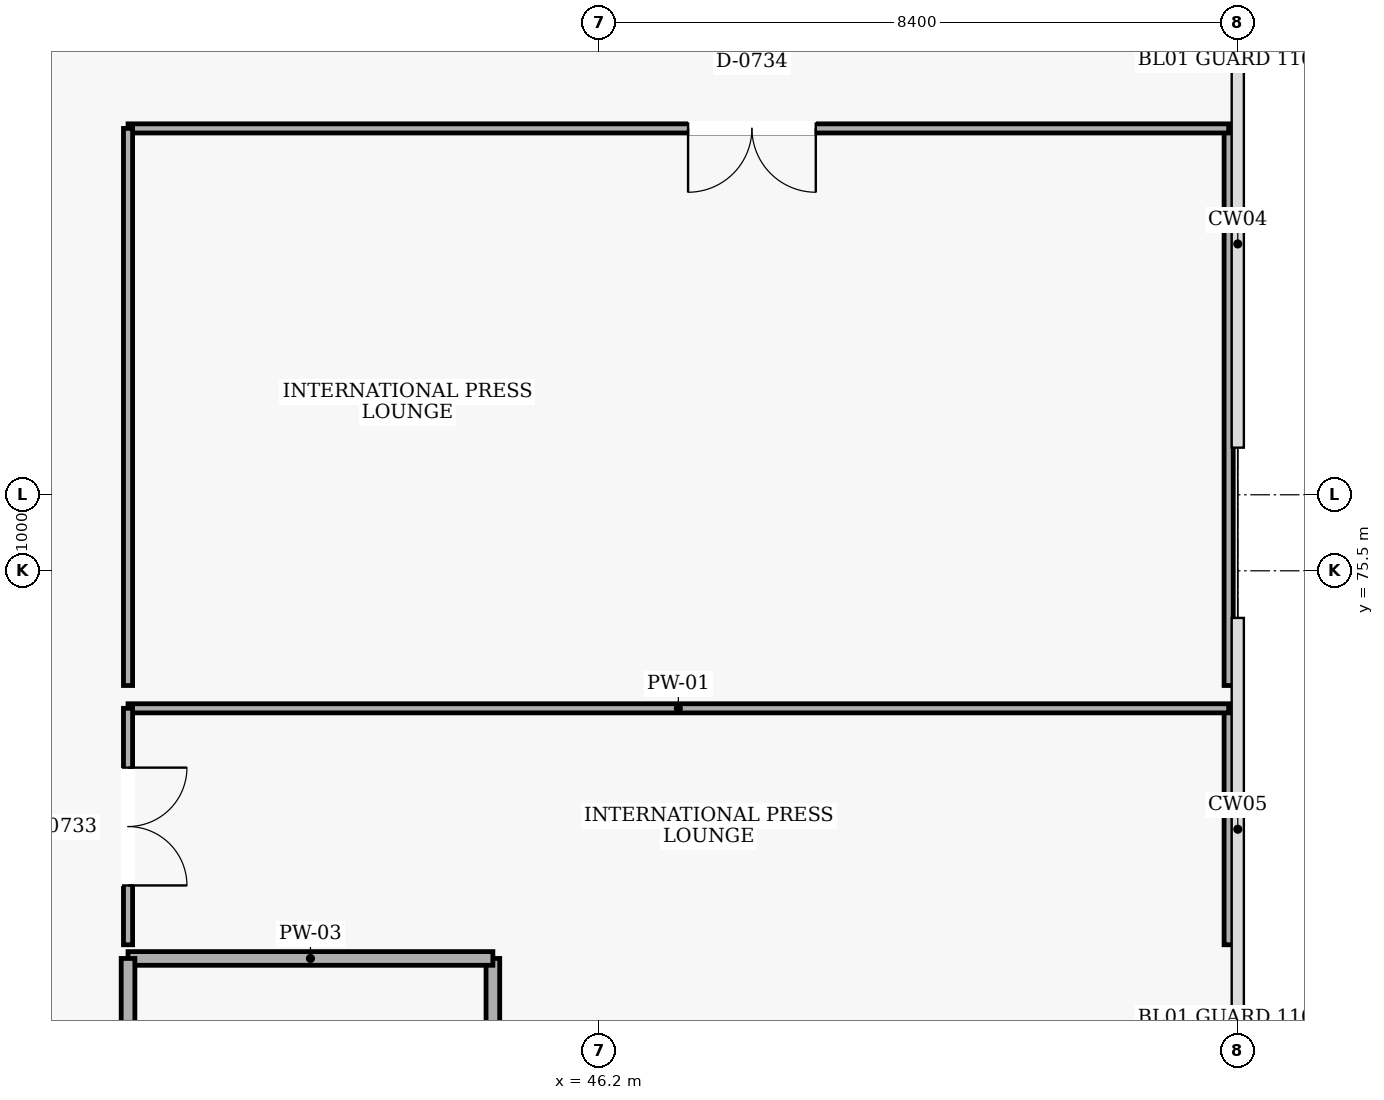
"""IFC4 building model, lengths in metres.
Left out: names, types, materials, properties, quantities, classifications, styles, units other than length and angle.
Written with IfcOpenShell. Run it as: python <this file> out.ifc"""

import sys

from ifc_helpers import new_model, si_unit, direction, frame, frame_2d, origin, place, context, subcontext, project, spatial, rectangle, extrude, element, fill, save


model = new_model("IFC4")
c1 = context("Model", 3, precision=1e-05, world=origin(), true_north=direction((0.0, 1.0)))
c2 = subcontext(c1, "Body", "Model", "MODEL_VIEW")
j1 = project(units=[si_unit("LENGTHUNIT", "METRE"), si_unit("PLANEANGLEUNIT", "RADIAN")], contexts=[c1])
p1 = place(None, origin())
s1 = spatial("IfcSite", under=j1, at=p1, CompositionType="ELEMENT")
p2 = place(p1, origin())
s2 = spatial("IfcBuilding", under=s1, at=p2, CompositionType="ELEMENT")
p3 = place(p2, frame((0.0, 0.0, 19.8)))
s3 = spatial("IfcBuildingStorey", under=s2, at=p3, CompositionType="ELEMENT", Elevation=19.8)
p4 = place(p3, frame((44.8, 67.2, 0.0), z_axis=(0.0, 0.0, 1.0), x_axis=(0.0, 1.0, 0.0)))
e1 = element("IfcWall", 1, at=p4, inside=s3, PredefinedType="PARTITIONING", context=c2, shape_type="SweptSolid", body=[
    extrude(rectangle(XDim=3.2, YDim=0.18, at=frame_2d((1.6, 0.0))), origin(), (0.0, 0.0, 1.0), 4.5),
])
p5 = place(p3, frame((44.8, 70.4, 0.0), z_axis=(0.0, 0.0, 1.0), x_axis=(-1.0, 0.0, 0.0)))
e2 = element("IfcWall", 2, at=p5, inside=s3, PredefinedType="PARTITIONING", context=c2, shape_type="SweptSolid", body=[
    extrude(rectangle(XDim=4.8, YDim=0.18, at=frame_2d((2.4, 0.0))), origin(), (0.0, 0.0, 1.0), 4.5),
])
p6 = place(p3, frame((40.0, 70.4, 0.0), z_axis=(0.0, 0.0, 1.0), x_axis=(0.0, -1.0, 0.0)))
e3 = element("IfcWall", 3, at=p6, inside=s3, PredefinedType="PARTITIONING", context=c2, shape_type="SweptSolid", body=[
    extrude(rectangle(XDim=3.2, YDim=0.18, at=frame_2d((1.6, 0.0))), origin(), (0.0, 0.0, 1.0), 4.5),
])
p7 = place(p6, frame((1.1, 0.0, 0.0)))
e4 = element("IfcOpeningElement", 4, at=p7, cuts=e3, PredefinedType="OPENING", context=c2, shape_type="SweptSolid", body=[
    extrude(rectangle(XDim=1.0, YDim=2.1, at=frame_2d((0.5, 1.05))), frame((0.0, 0.1, 0.0), z_axis=(0.0, -1.0, 0.0), x_axis=(1.0, 0.0, 0.0)), (0.0, 0.0, 1.0), 0.2),
])
p8 = place(p3, frame((54.48, 70.58, 0.0), z_axis=(0.0, 0.0, 1.0), x_axis=(0.0, 1.0, 0.0)))
e5 = element("IfcWall", 5, at=p8, inside=s3, PredefinedType="PARTITIONING", context=c2, shape_type="SweptSolid", body=[
    extrude(rectangle(XDim=3.111, YDim=0.12, at=frame_2d((1.555, 0.0))), origin(), (0.0, 0.0, 1.0), 4.5),
])
p9 = place(p3, frame((54.48, 73.691, 0.0), z_axis=(0.0, 0.0, 1.0), x_axis=(-1.0, 0.0, 0.0)))
e6 = element("IfcWall", 6, at=p9, inside=s3, PredefinedType="PARTITIONING", context=c2, shape_type="SweptSolid", body=[
    extrude(rectangle(XDim=14.48, YDim=0.12, at=frame_2d((7.24, 0.0))), origin(), (0.0, 0.0, 1.0), 4.5),
])
p10 = place(p3, frame((40.0, 73.691, 0.0), z_axis=(0.0, 0.0, 1.0), x_axis=(0.0, -1.0, 0.0)))
e7 = element("IfcWall", 7, at=p10, inside=s3, PredefinedType="PARTITIONING", context=c2, shape_type="SweptSolid", body=[
    extrude(rectangle(XDim=3.111, YDim=0.12, at=frame_2d((1.555, 0.0))), origin(), (0.0, 0.0, 1.0), 4.5),
])
p11 = place(p10, frame((0.781, 0.0, 0.0)))
e8 = element("IfcOpeningElement", 8, at=p11, cuts=e7, PredefinedType="OPENING", context=c2, shape_type="SweptSolid", body=[
    extrude(rectangle(XDim=1.55, YDim=2.2, at=frame_2d((0.775, 1.1))), frame((0.0, 0.07, 0.0), z_axis=(0.0, -1.0, 0.0), x_axis=(1.0, 0.0, 0.0)), (0.0, 0.0, 1.0), 0.14),
])
p12 = place(p3, frame((54.48, 73.991, 0.0), z_axis=(0.0, 0.0, 1.0), x_axis=(0.0, 1.0, 0.0)))
e9 = element("IfcWall", 9, at=p12, inside=s3, PredefinedType="PARTITIONING", context=c2, shape_type="SweptSolid", body=[
    extrude(rectangle(XDim=7.329, YDim=0.12, at=frame_2d((3.665, 0.0))), origin(), (0.0, 0.0, 1.0), 4.5),
])
p13 = place(p3, frame((54.48, 81.32, 0.0), z_axis=(0.0, 0.0, 1.0), x_axis=(-1.0, 0.0, 0.0)))
e10 = element("IfcWall", 10, at=p13, inside=s3, PredefinedType="PARTITIONING", context=c2, shape_type="SweptSolid", body=[
    extrude(rectangle(XDim=14.48, YDim=0.12, at=frame_2d((7.24, 0.0))), origin(), (0.0, 0.0, 1.0), 4.5),
])
p14 = place(p13, frame((5.432, 0.0, 0.0)))
e11 = element("IfcOpeningElement", 11, at=p14, cuts=e10, PredefinedType="OPENING", context=c2, shape_type="SweptSolid", body=[
    extrude(rectangle(XDim=1.68, YDim=2.25, at=frame_2d((0.84, 1.125))), frame((0.0, 0.07, 0.0), z_axis=(0.0, -1.0, 0.0), x_axis=(1.0, 0.0, 0.0)), (0.0, 0.0, 1.0), 0.14),
])
p15 = place(p3, frame((40.0, 81.32, 0.0), z_axis=(0.0, 0.0, 1.0), x_axis=(0.0, -1.0, 0.0)))
e12 = element("IfcWall", 12, at=p15, inside=s3, PredefinedType="PARTITIONING", context=c2, shape_type="SweptSolid", body=[
    extrude(rectangle(XDim=7.329, YDim=0.12, at=frame_2d((3.665, 0.0))), origin(), (0.0, 0.0, 1.0), 4.5),
])
p16 = place(p11, origin())
e13 = element("IfcDoor", 13, at=p16, inside=s3, OperationType="DOUBLE_DOOR_SINGLE_SWING", PredefinedType="DOOR", context=c2, shape_type="SweptSolid", body=[
    extrude(rectangle(XDim=1.55, YDim=2.2, at=frame_2d((0.775, 1.1))), frame((0.0, 0.025, 0.0), z_axis=(0.0, -1.0, 0.0), x_axis=(1.0, 0.0, 0.0)), (0.0, 0.0, 1.0), 0.05),
])
fill(e8, e13)
p17 = place(p14, origin())
e14 = element("IfcDoor", 14, at=p17, inside=s3, OperationType="DOUBLE_DOOR_SINGLE_SWING", PredefinedType="DOOR", context=c2, shape_type="SweptSolid", body=[
    extrude(rectangle(XDim=1.68, YDim=2.25, at=frame_2d((0.84, 1.125))), frame((0.0, 0.025, 0.0), z_axis=(0.0, -1.0, 0.0), x_axis=(1.0, 0.0, 0.0)), (0.0, 0.0, 1.0), 0.05),
])
fill(e11, e14)
save(model, sys.argv[1])
